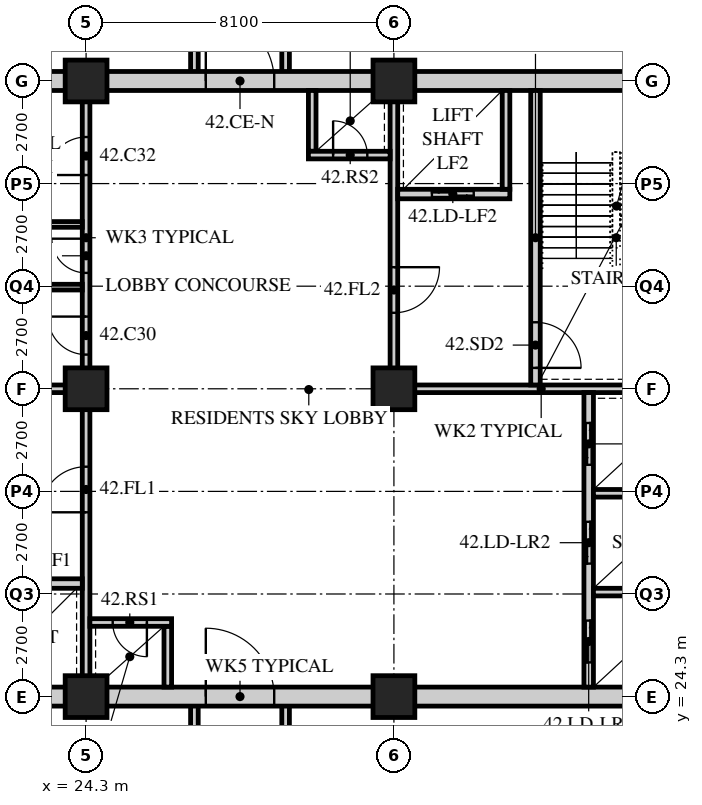
"""IFC4 building model, lengths in metres.
Left out: names, types, materials, properties, quantities, classifications, styles, units other than length and angle.
Written with IfcOpenShell. Run it as: python <this file> out.ifc"""

import sys

from ifc_helpers import new_model, si_unit, direction, frame, frame_2d, origin, origin_2d, place, context, subcontext, project, spatial, rectangle, hollow_rectangle, extrude, element, fill, save


model = new_model("IFC4")
c1 = context("Model", 3, precision=1e-05, world=origin(), true_north=direction((0.0, 1.0)))
c2 = subcontext(c1, "Body", "Model", "MODEL_VIEW")
j1 = project(units=[si_unit("LENGTHUNIT", "METRE"), si_unit("PLANEANGLEUNIT", "RADIAN")], contexts=[c1])
p1 = place(None, origin())
s1 = spatial("IfcSite", under=j1, at=p1, CompositionType="ELEMENT")
p2 = place(p1, origin())
s2 = spatial("IfcBuilding", under=s1, at=p2, CompositionType="ELEMENT")
p3 = place(p2, frame((0.0, 0.0, 165.0)))
s3 = spatial("IfcBuildingStorey", under=s2, at=p3, CompositionType="ELEMENT", Elevation=165.0)
for number, where, z_axis, x_axis in (
    (1, (24.3, 24.3, 0.0), (0.0, 0.0, 1.0), (1.0, 0.0, 0.0)),
    (2, (24.3, 32.4, 0.0), (0.0, 0.0, 1.0), (1.0, 0.0, 0.0)),
    (3, (24.3, 40.5, 0.0), (0.0, 0.0, 1.0), (1.0, 0.0, 0.0)),
    (4, (32.4, 24.3, 0.0), (0.0, 0.0, 1.0), (1.0, 0.0, 0.0)),
    (5, (32.4, 32.4, 0.0), (0.0, 0.0, 1.0), (1.0, 0.0, 0.0)),
    (6, (32.4, 40.5, 0.0), (0.0, 0.0, 1.0), (1.0, 0.0, 0.0)),
):
    element("IfcColumn", number, at=place(p3, frame(where, z_axis=z_axis, x_axis=x_axis)), inside=s3, PredefinedType="COLUMN", context=c2, shape_type="SweptSolid", body=[
        extrude(hollow_rectangle(XDim=1.1, YDim=1.1, WallThickness=0.1, at=origin_2d()), origin(), (0.0, 0.0, 1.0), 5.4),
    ])
for number, where, z_axis, x_axis in (
    (7, (27.15, 20.7, 0.0), (0.0, 0.0, 1.0), (0.0, 1.0, 0.0)),
    (8, (29.55, 20.7, 0.0), (0.0, 0.0, 1.0), (0.0, 1.0, 0.0)),
):
    element("IfcWall", number, at=place(p3, frame(where, z_axis=z_axis, x_axis=x_axis)), inside=s3, PredefinedType="SOLIDWALL", context=c2, shape_type="SweptSolid", body=[
        extrude(rectangle(XDim=3.6, YDim=0.2, at=frame_2d((1.8, 0.0))), origin(), (0.0, 0.0, 1.0), 5.19),
    ])
for number, where, z_axis, x_axis in (
    (9, (27.15, 40.5, 0.0), (0.0, 0.0, 1.0), (0.0, 1.0, 0.0)),
    (10, (29.55, 40.5, 0.0), (0.0, 0.0, 1.0), (0.0, 1.0, 0.0)),
):
    element("IfcWall", number, at=place(p3, frame(where, z_axis=z_axis, x_axis=x_axis)), inside=s3, PredefinedType="SOLIDWALL", context=c2, shape_type="SweptSolid", body=[
        extrude(rectangle(XDim=9.0, YDim=0.2, at=frame_2d((4.5, 0.0))), origin(), (0.0, 0.0, 1.0), 5.19),
    ])
p4 = place(p3, frame((15.95, 24.3, 0.0), z_axis=(0.0, 0.0, 1.0), x_axis=(1.0, 0.0, 0.0)))
e11 = element("IfcWall", 11, at=p4, inside=s3, PredefinedType="SOLIDWALL", context=c2, shape_type="SweptSolid", body=[
    extrude(rectangle(XDim=24.8, YDim=0.5, at=frame_2d((12.4, 0.0))), origin(), (0.0, 0.0, 1.0), 4.42),
])
p5 = place(p4, frame((11.5, 0.0, 0.0)))
e12 = element("IfcOpeningElement", 12, at=p5, cuts=e11, PredefinedType="OPENING", context=c2, shape_type="SweptSolid", body=[
    extrude(rectangle(XDim=1.8, YDim=2.4, at=frame_2d((0.9, 1.2))), frame((0.0, 0.26, 0.0), z_axis=(0.0, -1.0, 0.0), x_axis=(1.0, 0.0, 0.0)), (0.0, 0.0, 1.0), 0.52),
])
p6 = place(p3, frame((15.95, 40.5, 0.0), z_axis=(0.0, 0.0, 1.0), x_axis=(1.0, 0.0, 0.0)))
e13 = element("IfcWall", 13, at=p6, inside=s3, PredefinedType="SOLIDWALL", context=c2, shape_type="SweptSolid", body=[
    extrude(rectangle(XDim=24.8, YDim=0.5, at=frame_2d((12.4, 0.0))), origin(), (0.0, 0.0, 1.0), 4.42),
])
p7 = place(p6, frame((11.5, 0.0, 0.0)))
e14 = element("IfcOpeningElement", 14, at=p7, cuts=e13, PredefinedType="OPENING", context=c2, shape_type="SweptSolid", body=[
    extrude(rectangle(XDim=1.8, YDim=2.4, at=frame_2d((0.9, 1.2))), frame((0.0, 0.26, 0.0), z_axis=(0.0, -1.0, 0.0), x_axis=(1.0, 0.0, 0.0)), (0.0, 0.0, 1.0), 0.52),
])
p8 = place(p3, frame((16.45, 32.4, 0.0), z_axis=(0.0, 0.0, 1.0), x_axis=(1.0, 0.0, 0.0)))
e15 = element("IfcWall", 15, at=p8, inside=s3, PredefinedType="SOLIDWALL", context=c2, shape_type="SweptSolid", body=[
    extrude(rectangle(XDim=7.95, YDim=0.2, at=frame_2d((3.975, 0.0))), origin(), (0.0, 0.0, 1.0), 4.578),
])
p9 = place(p3, frame((24.3, 24.55, 0.0), z_axis=(0.0, 0.0, 1.0), x_axis=(0.0, 1.0, 0.0)))
e16 = element("IfcWall", 16, at=p9, inside=s3, PredefinedType="SOLIDWALL", context=c2, shape_type="SweptSolid", body=[
    extrude(rectangle(XDim=7.75, YDim=0.2, at=frame_2d((3.875, 0.0))), origin(), (0.0, 0.0, 1.0), 4.578),
])
p10 = place(p9, frame((4.6, 0.0, 0.0)))
e17 = element("IfcOpeningElement", 17, at=p10, cuts=e16, PredefinedType="OPENING", context=c2, shape_type="SweptSolid", body=[
    extrude(rectangle(XDim=1.2, YDim=2.1, at=frame_2d((0.6, 1.05))), frame((0.0, 0.11, 0.0), z_axis=(0.0, -1.0, 0.0), x_axis=(1.0, 0.0, 0.0)), (0.0, 0.0, 1.0), 0.22),
])
p11 = place(p3, frame((21.25, 27.275, 0.0), z_axis=(0.0, 0.0, 1.0), x_axis=(1.0, 0.0, 0.0)))
e18 = element("IfcWall", 18, at=p11, inside=s3, PredefinedType="SOLIDWALL", context=c2, shape_type="SweptSolid", body=[
    extrude(rectangle(XDim=2.95, YDim=0.25, at=frame_2d((1.475, 0.0))), origin(), (0.0, 0.0, 1.0), 5.19),
])
p12 = place(p11, frame((0.95, 0.0, 0.0)))
e19 = element("IfcOpeningElement", 19, at=p12, cuts=e18, PredefinedType="OPENING", context=c2, shape_type="SweptSolid", body=[
    extrude(rectangle(XDim=1.1, YDim=2.4, at=frame_2d((0.55, 1.2))), frame((0.0, 0.135, 0.0), z_axis=(0.0, -1.0, 0.0), x_axis=(1.0, 0.0, 0.0)), (0.0, 0.0, 1.0), 0.27),
])
p13 = place(p3, frame((26.45, 24.55, 0.0), z_axis=(0.0, 0.0, 1.0), x_axis=(0.0, 1.0, 0.0)))
e20 = element("IfcWall", 20, at=p13, inside=s3, PredefinedType="SOLIDWALL", context=c2, shape_type="SweptSolid", body=[
    extrude(rectangle(XDim=1.6, YDim=0.2, at=frame_2d((0.8, 0.0))), origin(), (0.0, 0.0, 1.0), 5.19),
])
p14 = place(p3, frame((24.4, 26.25, 0.0), z_axis=(0.0, 0.0, 1.0), x_axis=(1.0, 0.0, 0.0)))
e21 = element("IfcWall", 21, at=p14, inside=s3, PredefinedType="SOLIDWALL", context=c2, shape_type="SweptSolid", body=[
    extrude(rectangle(XDim=2.15, YDim=0.2, at=frame_2d((1.075, 0.0))), origin(), (0.0, 0.0, 1.0), 5.19),
])
p15 = place(p14, frame((0.6, 0.0, 0.0)))
e22 = element("IfcOpeningElement", 22, at=p15, cuts=e21, PredefinedType="OPENING", context=c2, shape_type="SweptSolid", body=[
    extrude(rectangle(XDim=0.9, YDim=2.1, at=frame_2d((0.45, 1.05))), frame((0.0, 0.11, 0.0), z_axis=(0.0, -1.0, 0.0), x_axis=(1.0, 0.0, 0.0)), (0.0, 0.0, 1.0), 0.22),
])
p16 = place(p3, frame((32.3, 32.4, 0.0), z_axis=(0.0, 0.0, 1.0), x_axis=(1.0, 0.0, 0.0)))
e23 = element("IfcWall", 23, at=p16, inside=s3, PredefinedType="SOLIDWALL", context=c2, shape_type="SweptSolid", body=[
    extrude(rectangle(XDim=7.95, YDim=0.2, at=frame_2d((3.975, 0.0))), origin(), (0.0, 0.0, 1.0), 4.578),
])
p17 = place(p3, frame((32.4, 32.5, 0.0), z_axis=(0.0, 0.0, 1.0), x_axis=(0.0, 1.0, 0.0)))
e24 = element("IfcWall", 24, at=p17, inside=s3, PredefinedType="SOLIDWALL", context=c2, shape_type="SweptSolid", body=[
    extrude(rectangle(XDim=7.75, YDim=0.2, at=frame_2d((3.875, 0.0))), origin(), (0.0, 0.0, 1.0), 4.578),
])
p18 = place(p17, frame((1.9, 0.0, 0.0)))
e25 = element("IfcOpeningElement", 25, at=p18, cuts=e24, PredefinedType="OPENING", context=c2, shape_type="SweptSolid", body=[
    extrude(rectangle(XDim=1.2, YDim=2.1, at=frame_2d((0.6, 1.05))), frame((0.0, 0.11, 0.0), z_axis=(0.0, -1.0, 0.0), x_axis=(1.0, 0.0, 0.0)), (0.0, 0.0, 1.0), 0.22),
])
p19 = place(p3, frame((37.525, 24.55, 0.0), z_axis=(0.0, 0.0, 1.0), x_axis=(0.0, 1.0, 0.0)))
e26 = element("IfcWall", 26, at=p19, inside=s3, PredefinedType="SOLIDWALL", context=c2, shape_type="SweptSolid", body=[
    extrude(rectangle(XDim=7.75, YDim=0.25, at=frame_2d((3.875, 0.0))), origin(), (0.0, 0.0, 1.0), 5.19),
])
p20 = place(p19, frame((0.65, 0.0, 0.0)))
e27 = element("IfcOpeningElement", 27, at=p20, cuts=e26, PredefinedType="OPENING", context=c2, shape_type="SweptSolid", body=[
    extrude(rectangle(XDim=1.1, YDim=2.4, at=frame_2d((0.55, 1.2))), frame((0.0, 0.135, 0.0), z_axis=(0.0, -1.0, 0.0), x_axis=(1.0, 0.0, 0.0)), (0.0, 0.0, 1.0), 0.27),
])
p21 = place(p19, frame((3.25, 0.0, 0.0)))
e28 = element("IfcOpeningElement", 28, at=p21, cuts=e26, PredefinedType="OPENING", context=c2, shape_type="SweptSolid", body=[
    extrude(rectangle(XDim=1.1, YDim=2.4, at=frame_2d((0.55, 1.2))), frame((0.0, 0.135, 0.0), z_axis=(0.0, -1.0, 0.0), x_axis=(1.0, 0.0, 0.0)), (0.0, 0.0, 1.0), 0.27),
])
p22 = place(p19, frame((5.85, 0.0, 0.0)))
e29 = element("IfcOpeningElement", 29, at=p22, cuts=e26, PredefinedType="OPENING", context=c2, shape_type="SweptSolid", body=[
    extrude(rectangle(XDim=1.1, YDim=2.4, at=frame_2d((0.55, 1.2))), frame((0.0, 0.135, 0.0), z_axis=(0.0, -1.0, 0.0), x_axis=(1.0, 0.0, 0.0)), (0.0, 0.0, 1.0), 0.27),
])
for number, where, z_axis, x_axis in (
    (30, (37.65, 27.05, 0.0), (0.0, 0.0, 1.0), (1.0, 0.0, 0.0)),
    (31, (37.65, 29.65, 0.0), (0.0, 0.0, 1.0), (1.0, 0.0, 0.0)),
):
    element("IfcWall", number, at=place(p3, frame(where, z_axis=z_axis, x_axis=x_axis)), inside=s3, PredefinedType="SOLIDWALL", context=c2, shape_type="SweptSolid", body=[
        extrude(rectangle(XDim=2.6, YDim=0.2, at=frame_2d((1.3, 0.0))), origin(), (0.0, 0.0, 1.0), 5.19),
    ])
p23 = place(p3, frame((36.125, 32.5, 0.0), z_axis=(0.0, 0.0, 1.0), x_axis=(0.0, 1.0, 0.0)))
e32 = element("IfcWall", 32, at=p23, inside=s3, PredefinedType="SOLIDWALL", context=c2, shape_type="SweptSolid", body=[
    extrude(rectangle(XDim=7.75, YDim=0.25, at=frame_2d((3.875, 0.0))), origin(), (0.0, 0.0, 1.0), 5.19),
])
p24 = place(p23, frame((0.45, 0.0, 0.0)))
e33 = element("IfcOpeningElement", 33, at=p24, cuts=e32, PredefinedType="OPENING", context=c2, shape_type="SweptSolid", body=[
    extrude(rectangle(XDim=1.2, YDim=2.1, at=frame_2d((0.6, 1.05))), frame((0.0, 0.135, 0.0), z_axis=(0.0, -1.0, 0.0), x_axis=(1.0, 0.0, 0.0)), (0.0, 0.0, 1.0), 0.27),
])
p25 = place(p3, frame((32.5, 37.525, 0.0), z_axis=(0.0, 0.0, 1.0), x_axis=(1.0, 0.0, 0.0)))
e34 = element("IfcWall", 34, at=p25, inside=s3, PredefinedType="SOLIDWALL", context=c2, shape_type="SweptSolid", body=[
    extrude(rectangle(XDim=2.95, YDim=0.25, at=frame_2d((1.475, 0.0))), origin(), (0.0, 0.0, 1.0), 5.19),
])
p26 = place(p25, frame((0.9, 0.0, 0.0)))
e35 = element("IfcOpeningElement", 35, at=p26, cuts=e34, PredefinedType="OPENING", context=c2, shape_type="SweptSolid", body=[
    extrude(rectangle(XDim=1.1, YDim=2.4, at=frame_2d((0.55, 1.2))), frame((0.0, 0.135, 0.0), z_axis=(0.0, -1.0, 0.0), x_axis=(1.0, 0.0, 0.0)), (0.0, 0.0, 1.0), 0.27),
])
p27 = place(p3, frame((35.35, 37.65, 0.0), z_axis=(0.0, 0.0, 1.0), x_axis=(0.0, 1.0, 0.0)))
e36 = element("IfcWall", 36, at=p27, inside=s3, PredefinedType="SOLIDWALL", context=c2, shape_type="SweptSolid", body=[
    extrude(rectangle(XDim=2.6, YDim=0.2, at=frame_2d((1.3, 0.0))), origin(), (0.0, 0.0, 1.0), 5.19),
])
p28 = place(p3, frame((30.25, 38.65, 0.0), z_axis=(0.0, 0.0, 1.0), x_axis=(0.0, 1.0, 0.0)))
e37 = element("IfcWall", 37, at=p28, inside=s3, PredefinedType="SOLIDWALL", context=c2, shape_type="SweptSolid", body=[
    extrude(rectangle(XDim=1.6, YDim=0.2, at=frame_2d((0.8, 0.0))), origin(), (0.0, 0.0, 1.0), 5.19),
])
p29 = place(p3, frame((30.15, 38.55, 0.0), z_axis=(0.0, 0.0, 1.0), x_axis=(1.0, 0.0, 0.0)))
e38 = element("IfcWall", 38, at=p29, inside=s3, PredefinedType="SOLIDWALL", context=c2, shape_type="SweptSolid", body=[
    extrude(rectangle(XDim=2.15, YDim=0.2, at=frame_2d((1.075, 0.0))), origin(), (0.0, 0.0, 1.0), 5.19),
])
p30 = place(p29, frame((0.65, 0.0, 0.0)))
e39 = element("IfcOpeningElement", 39, at=p30, cuts=e38, PredefinedType="OPENING", context=c2, shape_type="SweptSolid", body=[
    extrude(rectangle(XDim=0.9, YDim=2.1, at=frame_2d((0.45, 1.05))), frame((0.0, 0.11, 0.0), z_axis=(0.0, -1.0, 0.0), x_axis=(1.0, 0.0, 0.0)), (0.0, 0.0, 1.0), 0.22),
])
p31 = place(p3, frame((24.3, 32.5, 0.0), z_axis=(0.0, 0.0, 1.0), x_axis=(0.0, 1.0, 0.0)))
e40 = element("IfcWall", 40, at=p31, inside=s3, PredefinedType="PARTITIONING", context=c2, shape_type="SweptSolid", body=[
    extrude(rectangle(XDim=7.75, YDim=0.2, at=frame_2d((3.875, 0.0))), origin(), (0.0, 0.0, 1.0), 4.578),
])
p32 = place(p31, frame((0.8, 0.0, 0.0)))
e41 = element("IfcOpeningElement", 41, at=p32, cuts=e40, PredefinedType="OPENING", context=c2, shape_type="SweptSolid", body=[
    extrude(rectangle(XDim=1.0, YDim=2.1, at=frame_2d((0.5, 1.05))), frame((0.0, 0.11, 0.0), z_axis=(0.0, -1.0, 0.0), x_axis=(1.0, 0.0, 0.0)), (0.0, 0.0, 1.0), 0.22),
])
p33 = place(p31, frame((2.95, 0.0, 0.0)))
e42 = element("IfcOpeningElement", 42, at=p33, cuts=e40, PredefinedType="OPENING", context=c2, shape_type="SweptSolid", body=[
    extrude(rectangle(XDim=0.9, YDim=2.1, at=frame_2d((0.45, 1.05))), frame((0.0, 0.11, 0.0), z_axis=(0.0, -1.0, 0.0), x_axis=(1.0, 0.0, 0.0)), (0.0, 0.0, 1.0), 0.22),
])
p34 = place(p31, frame((5.525, 0.0, 0.0)))
e43 = element("IfcOpeningElement", 43, at=p34, cuts=e40, PredefinedType="OPENING", context=c2, shape_type="SweptSolid", body=[
    extrude(rectangle(XDim=1.0, YDim=2.1, at=frame_2d((0.5, 1.05))), frame((0.0, 0.11, 0.0), z_axis=(0.0, -1.0, 0.0), x_axis=(1.0, 0.0, 0.0)), (0.0, 0.0, 1.0), 0.22),
])
for number, where, z_axis, x_axis in (
    (44, (21.05, 35.075, 0.0), (0.0, 0.0, 1.0), (1.0, 0.0, 0.0)),
    (45, (21.05, 36.725, 0.0), (0.0, 0.0, 1.0), (1.0, 0.0, 0.0)),
):
    element("IfcWall", number, at=place(p3, frame(where, z_axis=z_axis, x_axis=x_axis)), inside=s3, PredefinedType="PARTITIONING", context=c2, shape_type="SweptSolid", body=[
        extrude(rectangle(XDim=3.15, YDim=0.15, at=frame_2d((1.575, 0.0))), origin(), (0.0, 0.0, 1.0), 5.19),
    ])
p35 = place(p32, origin())
e46 = element("IfcDoor", 46, at=p35, inside=s3, OperationType="SINGLE_SWING_RIGHT", PredefinedType="DOOR", context=c2, shape_type="SweptSolid", body=[
    extrude(rectangle(XDim=1.0, YDim=2.1, at=frame_2d((0.5, 1.05))), frame((0.0, 0.025, 0.0), z_axis=(0.0, -1.0, 0.0), x_axis=(1.0, 0.0, 0.0)), (0.0, 0.0, 1.0), 0.05),
])
fill(e41, e46)
p36 = place(p33, origin())
e47 = element("IfcDoor", 47, at=p36, inside=s3, OperationType="SINGLE_SWING_RIGHT", PredefinedType="DOOR", context=c2, shape_type="SweptSolid", body=[
    extrude(rectangle(XDim=0.9, YDim=2.1, at=frame_2d((0.45, 1.05))), frame((0.0, 0.025, 0.0), z_axis=(0.0, -1.0, 0.0), x_axis=(1.0, 0.0, 0.0)), (0.0, 0.0, 1.0), 0.05),
])
fill(e42, e47)
p37 = place(p34, origin())
e48 = element("IfcDoor", 48, at=p37, inside=s3, OperationType="SINGLE_SWING_LEFT", PredefinedType="DOOR", context=c2, shape_type="SweptSolid", body=[
    extrude(rectangle(XDim=1.0, YDim=2.1, at=frame_2d((0.5, 1.05))), frame((0.0, 0.025, 0.0), z_axis=(0.0, -1.0, 0.0), x_axis=(1.0, 0.0, 0.0)), (0.0, 0.0, 1.0), 0.05),
])
fill(e43, e48)
p38 = place(p10, origin())
e49 = element("IfcDoor", 49, at=p38, inside=s3, OperationType="SINGLE_SWING_LEFT", PredefinedType="DOOR", context=c2, shape_type="SweptSolid", body=[
    extrude(rectangle(XDim=1.2, YDim=2.1, at=frame_2d((0.6, 1.05))), frame((0.0, 0.025, 0.0), z_axis=(0.0, -1.0, 0.0), x_axis=(1.0, 0.0, 0.0)), (0.0, 0.0, 1.0), 0.05),
])
fill(e17, e49)
p39 = place(p15, origin())
e50 = element("IfcDoor", 50, at=p39, inside=s3, OperationType="SINGLE_SWING_LEFT", PredefinedType="DOOR", context=c2, shape_type="SweptSolid", body=[
    extrude(rectangle(XDim=0.9, YDim=2.1, at=frame_2d((0.45, 1.05))), frame((0.0, 0.025, 0.0), z_axis=(0.0, -1.0, 0.0), x_axis=(1.0, 0.0, 0.0)), (0.0, 0.0, 1.0), 0.05),
])
fill(e22, e50)
p40 = place(p24, origin())
e51 = element("IfcDoor", 51, at=p40, inside=s3, OperationType="SINGLE_SWING_RIGHT", PredefinedType="DOOR", context=c2, shape_type="SweptSolid", body=[
    extrude(rectangle(XDim=1.2, YDim=2.1, at=frame_2d((0.6, 1.05))), frame((0.0, 0.025, 0.0), z_axis=(0.0, -1.0, 0.0), x_axis=(1.0, 0.0, 0.0)), (0.0, 0.0, 1.0), 0.05),
])
fill(e33, e51)
p41 = place(p18, origin())
e52 = element("IfcDoor", 52, at=p41, inside=s3, OperationType="SINGLE_SWING_LEFT", PredefinedType="DOOR", context=c2, shape_type="SweptSolid", body=[
    extrude(rectangle(XDim=1.2, YDim=2.1, at=frame_2d((0.6, 1.05))), frame((0.0, 0.025, 0.0), z_axis=(0.0, -1.0, 0.0), x_axis=(1.0, 0.0, 0.0)), (0.0, 0.0, 1.0), 0.05),
])
fill(e25, e52)
p42 = place(p30, origin())
e53 = element("IfcDoor", 53, at=p42, inside=s3, OperationType="SINGLE_SWING_LEFT", PredefinedType="DOOR", context=c2, shape_type="SweptSolid", body=[
    extrude(rectangle(XDim=0.9, YDim=2.1, at=frame_2d((0.45, 1.05))), frame((0.0, 0.025, 0.0), z_axis=(0.0, -1.0, 0.0), x_axis=(1.0, 0.0, 0.0)), (0.0, 0.0, 1.0), 0.05),
])
fill(e39, e53)
p43 = place(p20, origin())
e54 = element("IfcDoor", 54, at=p43, inside=s3, OperationType="DOUBLE_DOOR_SLIDING", PredefinedType="DOOR", context=c2, shape_type="SweptSolid", body=[
    extrude(rectangle(XDim=1.1, YDim=2.4, at=frame_2d((0.55, 1.2))), frame((0.0, 0.025, 0.0), z_axis=(0.0, -1.0, 0.0), x_axis=(1.0, 0.0, 0.0)), (0.0, 0.0, 1.0), 0.05),
])
fill(e27, e54)
p44 = place(p21, origin())
e55 = element("IfcDoor", 55, at=p44, inside=s3, OperationType="DOUBLE_DOOR_SLIDING", PredefinedType="DOOR", context=c2, shape_type="SweptSolid", body=[
    extrude(rectangle(XDim=1.1, YDim=2.4, at=frame_2d((0.55, 1.2))), frame((0.0, 0.025, 0.0), z_axis=(0.0, -1.0, 0.0), x_axis=(1.0, 0.0, 0.0)), (0.0, 0.0, 1.0), 0.05),
])
fill(e28, e55)
p45 = place(p22, origin())
e56 = element("IfcDoor", 56, at=p45, inside=s3, OperationType="DOUBLE_DOOR_SLIDING", PredefinedType="DOOR", context=c2, shape_type="SweptSolid", body=[
    extrude(rectangle(XDim=1.1, YDim=2.4, at=frame_2d((0.55, 1.2))), frame((0.0, 0.025, 0.0), z_axis=(0.0, -1.0, 0.0), x_axis=(1.0, 0.0, 0.0)), (0.0, 0.0, 1.0), 0.05),
])
fill(e29, e56)
p46 = place(p26, origin())
e57 = element("IfcDoor", 57, at=p46, inside=s3, OperationType="DOUBLE_DOOR_SLIDING", PredefinedType="DOOR", context=c2, shape_type="SweptSolid", body=[
    extrude(rectangle(XDim=1.1, YDim=2.4, at=frame_2d((0.55, 1.2))), frame((0.0, 0.025, 0.0), z_axis=(0.0, -1.0, 0.0), x_axis=(1.0, 0.0, 0.0)), (0.0, 0.0, 1.0), 0.05),
])
fill(e35, e57)
p47 = place(p5, origin())
e58 = element("IfcDoor", 58, at=p47, inside=s3, OperationType="DOUBLE_DOOR_SINGLE_SWING", PredefinedType="DOOR", context=c2, shape_type="SweptSolid", body=[
    extrude(rectangle(XDim=1.8, YDim=2.4, at=frame_2d((0.9, 1.2))), frame((0.0, 0.025, 0.0), z_axis=(0.0, -1.0, 0.0), x_axis=(1.0, 0.0, 0.0)), (0.0, 0.0, 1.0), 0.05),
])
fill(e12, e58)
p48 = place(p7, origin())
e59 = element("IfcDoor", 59, at=p48, inside=s3, OperationType="DOUBLE_DOOR_SINGLE_SWING", PredefinedType="DOOR", context=c2, shape_type="SweptSolid", body=[
    extrude(rectangle(XDim=1.8, YDim=2.4, at=frame_2d((0.9, 1.2))), frame((0.0, 0.025, 0.0), z_axis=(0.0, -1.0, 0.0), x_axis=(1.0, 0.0, 0.0)), (0.0, 0.0, 1.0), 0.05),
])
fill(e14, e59)
save(model, sys.argv[1])
